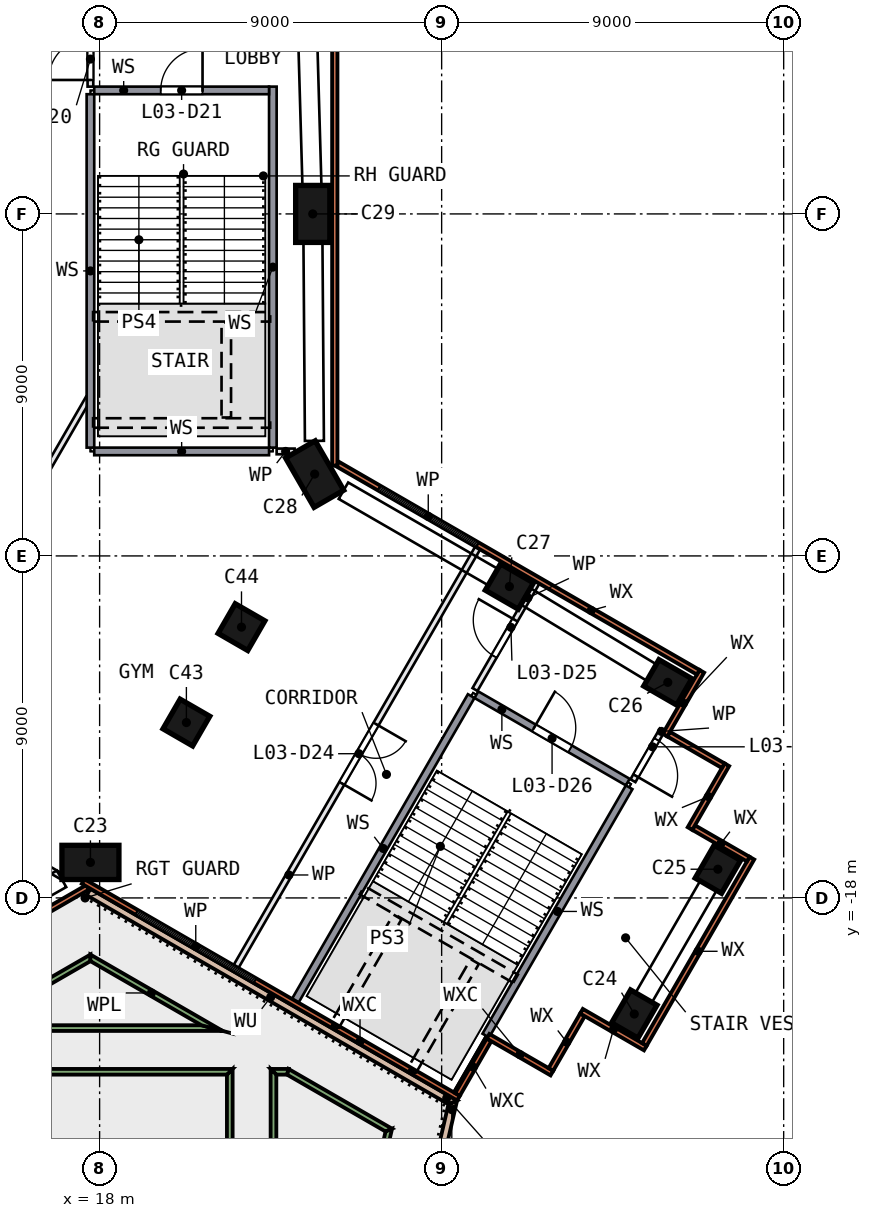
"""IFC4 building model, lengths in metres.
Left out: names, types, materials, properties, quantities, classifications, styles, units other than length and angle.
Written with IfcOpenShell. Run it as: python <this file> out.ifc"""

import sys

from ifc_helpers import new_model, si_unit, direction, frame, frame_2d, origin, origin_2d, place, context, subcontext, project, spatial, polyline, rectangle, outline, extrude, element, fill, save


model = new_model("IFC4")
c1 = context("Model", 3, precision=1e-05, world=origin(), true_north=direction((0.0, 1.0)))
c2 = subcontext(c1, "Body", "Model", "MODEL_VIEW")
j1 = project(units=[si_unit("LENGTHUNIT", "METRE"), si_unit("PLANEANGLEUNIT", "RADIAN")], contexts=[c1])
p1 = place(None, origin())
s1 = spatial("IfcSite", under=j1, at=p1, CompositionType="ELEMENT")
p2 = place(p1, origin())
s2 = spatial("IfcBuilding", under=s1, at=p2, CompositionType="ELEMENT")
p3 = place(p2, frame((0.0, 0.0, 19.0)))
s3 = spatial("IfcBuildingStorey", under=s2, at=p3, CompositionType="ELEMENT", Elevation=19.0)
p4 = place(p3, frame((17.758, -17.065, 0.0), z_axis=(0.0, 0.0, 1.0), x_axis=(-1.0, 0.0, 0.0)))
e1 = element("IfcColumn", 1, at=p4, inside=s3, PredefinedType="COLUMN", context=c2, shape_type="SweptSolid", body=[
    extrude(rectangle(XDim=1.5, YDim=0.9, at=origin_2d()), origin(), (0.0, 0.0, 1.0), 4.05),
])
for number, where, z_axis, x_axis in (
    (2, (32.069, -21.055, 0.0), (0.0, 0.0, 1.0), (0.5, 0.866, 0.0)),
    (3, (34.269, -17.245, 0.0), (0.0, 0.0, 1.0), (0.5, 0.866, 0.0)),
    (4, (32.951, -12.327, 0.0), (0.0, 0.0, 1.0), (-0.866, 0.5, 0.0)),
    (5, (28.783, -9.805, 0.0), (0.0, 0.0, 1.0), (-0.866, 0.5, 0.0)),
):
    element("IfcColumn", number, at=place(p3, frame(where, z_axis=z_axis, x_axis=x_axis)), inside=s3, PredefinedType="COLUMN", context=c2, shape_type="SweptSolid", body=[
        extrude(rectangle(XDim=1.0, YDim=0.8, at=origin_2d()), origin(), (0.0, 0.0, 1.0), 4.05),
    ])
for number, where, z_axis, x_axis in (
    (6, (23.658, -6.846, 0.0), (0.0, 0.0, 1.0), (0.5, -0.866, 0.0)),
    (7, (23.608, 0.0, 0.0), (0.0, 0.0, 1.0), (0.0, 1.0, 0.0)),
):
    element("IfcColumn", number, at=place(p3, frame(where, z_axis=z_axis, x_axis=x_axis)), inside=s3, PredefinedType="COLUMN", context=c2, shape_type="SweptSolid", body=[
        extrude(rectangle(XDim=1.5, YDim=0.9, at=origin_2d()), origin(), (0.0, 0.0, 1.0), 4.05),
    ])
for number, where, z_axis, x_axis in (
    (8, (20.283, -13.385, 0.0), (0.0, 0.0, 1.0), (0.866, -0.5, 0.0)),
    (9, (21.733, -10.873, 0.0), (0.0, 0.0, 1.0), (0.866, -0.5, 0.0)),
):
    element("IfcColumn", number, at=place(p3, frame(where, z_axis=z_axis, x_axis=x_axis)), inside=s3, PredefinedType="COLUMN", context=c2, shape_type="SweptSolid", body=[
        extrude(rectangle(XDim=0.9, YDim=0.9, at=origin_2d()), origin(), (0.0, 0.0, 1.0), 4.05),
    ])
p5 = place(p3, frame((6.603, -24.118, 0.0), z_axis=(0.0, 0.0, 1.0), x_axis=(0.866023287, 0.500003667, 0.0)))
e10 = element("IfcWall", 10, at=p5, inside=s3, PredefinedType="SOLIDWALL", context=c2, shape_type="SweptSolid", body=[
    extrude(rectangle(XDim=12.801, YDim=0.14, at=frame_2d((6.4, 0.0))), origin(), (0.0, 0.0, 1.0), 4.05),
])
p6 = place(p5, frame((1.748, 0.0, 0.9)))
e11 = element("IfcOpeningElement", 11, at=p6, cuts=e10, PredefinedType="OPENING", context=c2, shape_type="SweptSolid", body=[
    extrude(rectangle(XDim=3.0, YDim=2.4, at=frame_2d((1.5, 1.2))), frame((0.0, 0.08, 0.0), z_axis=(0.0, -1.0, 0.0), x_axis=(1.0, 0.0, 0.0)), (0.0, 0.0, 1.0), 0.16),
])
p7 = place(p5, frame((8.802, 0.0, 0.0)))
e12 = element("IfcOpeningElement", 12, at=p7, cuts=e10, PredefinedType="OPENING", context=c2, shape_type="SweptSolid", body=[
    extrude(rectangle(XDim=1.8, YDim=2.4, at=frame_2d((0.9, 1.2))), frame((0.0, 0.08, 0.0), z_axis=(0.0, -1.0, 0.0), x_axis=(1.0, 0.0, 0.0)), (0.0, 0.0, 1.0), 0.16),
])
p8 = place(p3, frame((17.565, -17.566, 0.0), z_axis=(0.0, 0.0, 1.0), x_axis=(0.866028022, -0.499995465, 0.0)))
e13 = element("IfcWall", 13, at=p8, inside=s3, PredefinedType="SOLIDWALL", context=c2, shape_type="SweptSolid", body=[
    extrude(rectangle(XDim=11.405, YDim=0.14, at=frame_2d((5.702, 0.0))), origin(), (0.0, 0.0, 1.0), 4.05),
])
p9 = place(p8, frame((1.623, 0.0, 0.9)))
e14 = element("IfcOpeningElement", 14, at=p9, cuts=e13, PredefinedType="OPENING", context=c2, shape_type="SweptSolid", body=[
    extrude(rectangle(XDim=3.6, YDim=2.4, at=frame_2d((1.8, 1.2))), frame((0.0, 0.08, 0.0), z_axis=(0.0, -1.0, 0.0), x_axis=(1.0, 0.0, 0.0)), (0.0, 0.0, 1.0), 0.16),
])
p10 = place(p3, frame((27.417, -23.173, 0.0), z_axis=(0.0, 0.0, 1.0), x_axis=(0.499951638, 0.866053324, 0.0)))
e15 = element("IfcWall", 15, at=p10, inside=s3, PredefinedType="SOLIDWALL", context=c2, shape_type="SweptSolid", body=[
    extrude(rectangle(XDim=1.66, YDim=0.14, at=frame_2d((0.83, 0.0))), origin(), (0.0, 0.0, 1.0), 4.05),
])
p11 = place(p3, frame((28.221, -21.64, 0.0), z_axis=(0.0, 0.0, 1.0), x_axis=(0.866011627, -0.500023862, 0.0)))
e16 = element("IfcWall", 16, at=p11, inside=s3, PredefinedType="SOLIDWALL", context=c2, shape_type="SweptSolid", body=[
    extrude(rectangle(XDim=1.94, YDim=0.14, at=frame_2d((0.97, 0.0))), origin(), (0.0, 0.0, 1.0), 4.05),
])
p12 = place(p3, frame((29.875, -22.514, 0.0), z_axis=(0.0, 0.0, 1.0), x_axis=(0.499998264, 0.866026406, 0.0)))
e17 = element("IfcWall", 17, at=p12, inside=s3, PredefinedType="SOLIDWALL", context=c2, shape_type="SweptSolid", body=[
    extrude(rectangle(XDim=1.66, YDim=0.14, at=frame_2d((0.83, 0.0))), origin(), (0.0, 0.0, 1.0), 4.05),
])
p13 = place(p3, frame((30.68, -20.981, 0.0), z_axis=(0.0, 0.0, 1.0), x_axis=(0.866043088, -0.499969368, 0.0)))
e18 = element("IfcWall", 18, at=p13, inside=s3, PredefinedType="SOLIDWALL", context=c2, shape_type="SweptSolid", body=[
    extrude(rectangle(XDim=1.94, YDim=0.14, at=frame_2d((0.97, 0.0))), origin(), (0.0, 0.0, 1.0), 4.05),
])
p14 = place(p3, frame((32.334, -21.855, 0.0), z_axis=(0.0, 0.0, 1.0), x_axis=(0.499985074, 0.866034021, 0.0)))
e19 = element("IfcWall", 19, at=p14, inside=s3, PredefinedType="SOLIDWALL", context=c2, shape_type="SweptSolid", body=[
    extrude(rectangle(XDim=5.66, YDim=0.14, at=frame_2d((2.83, 0.0))), origin(), (0.0, 0.0, 1.0), 4.05),
])
p15 = place(p3, frame((35.069, -16.979, 0.0), z_axis=(0.0, 0.0, 1.0), x_axis=(-0.866053324, 0.499951638, 0.0)))
e20 = element("IfcWall", 20, at=p15, inside=s3, PredefinedType="SOLIDWALL", context=c2, shape_type="SweptSolid", body=[
    extrude(rectangle(XDim=1.66, YDim=0.14, at=frame_2d((0.83, 0.0))), origin(), (0.0, 0.0, 1.0), 4.05),
])
p16 = place(p3, frame((33.535, -16.175, 0.0), z_axis=(0.0, 0.0, 1.0), x_axis=(0.500063744, 0.865988598, 0.0)))
e21 = element("IfcWall", 21, at=p16, inside=s3, PredefinedType="SOLIDWALL", context=c2, shape_type="SweptSolid", body=[
    extrude(rectangle(XDim=1.94, YDim=0.14, at=frame_2d((0.97, 0.0))), origin(), (0.0, 0.0, 1.0), 4.05),
])
p17 = place(p3, frame((34.41, -14.52, 0.0), z_axis=(0.0, 0.0, 1.0), x_axis=(-0.865989634, 0.500061949, 0.0)))
e22 = element("IfcWall", 22, at=p17, inside=s3, PredefinedType="SOLIDWALL", context=c2, shape_type="SweptSolid", body=[
    extrude(rectangle(XDim=1.66, YDim=0.14, at=frame_2d((0.83, 0.0))), origin(), (0.0, 0.0, 1.0), 4.05),
])
p18 = place(p3, frame((32.877, -13.716, 0.0), z_axis=(0.0, 0.0, 1.0), x_axis=(0.500023862, 0.866011627, 0.0)))
e23 = element("IfcWall", 23, at=p18, inside=s3, PredefinedType="SOLIDWALL", context=c2, shape_type="SweptSolid", body=[
    extrude(rectangle(XDim=1.94, YDim=0.14, at=frame_2d((0.97, 0.0))), origin(), (0.0, 0.0, 1.0), 4.05),
])
p19 = place(p3, frame((33.751, -12.062, 0.0), z_axis=(0.0, 0.0, 1.0), x_axis=(-0.86602647, 0.499998154, 0.0)))
e24 = element("IfcWall", 24, at=p19, inside=s3, PredefinedType="SOLIDWALL", context=c2, shape_type="SweptSolid", body=[
    extrude(rectangle(XDim=10.961, YDim=0.14, at=frame_2d((5.481, 0.0))), origin(), (0.0, 0.0, 1.0), 4.05),
])
p20 = place(p19, frame((6.702, 0.0, 0.9)))
e25 = element("IfcOpeningElement", 25, at=p20, cuts=e24, PredefinedType="OPENING", context=c2, shape_type="SweptSolid", body=[
    extrude(rectangle(XDim=3.0, YDim=2.4, at=frame_2d((1.5, 1.2))), frame((0.0, 0.08, 0.0), z_axis=(0.0, -1.0, 0.0), x_axis=(1.0, 0.0, 0.0)), (0.0, 0.0, 1.0), 0.16),
])
p21 = place(p3, frame((24.188, -6.621, 0.0), z_axis=(0.0, 0.0, 1.0), x_axis=(0.0, 1.0, 0.0)))
e26 = element("IfcWall", 26, at=p21, inside=s3, PredefinedType="SOLIDWALL", context=c2, shape_type="SweptSolid", body=[
    extrude(rectangle(XDim=13.242, YDim=0.14, at=frame_2d((6.621, 0.0))), origin(), (0.0, 0.0, 1.0), 4.05),
])
p22 = place(p3, origin())
e27 = element("IfcWall", 27, at=p22, inside=s3, PredefinedType="SOLIDWALL", context=c2, shape_type="SweptSolid", body=[
    extrude(outline(polyline([(25.128, -32.3), (25.287, -32.5), (27.407, -23.329), (27.179, -23.428), (25.128, -32.3)])), origin(), (0.0, 0.0, 1.0), 0.45),
])
p23 = place(p3, origin())
e28 = element("IfcWall", 28, at=p23, inside=s3, PredefinedType="SOLIDWALL", context=c2, shape_type="SweptSolid", body=[
    extrude(outline(polyline([(27.179, -23.428), (27.407, -23.329), (17.758, -17.758), (17.658, -17.931), (27.179, -23.428)])), origin(), (0.0, 0.0, 1.0), 0.45),
])
p24 = place(p3, origin())
e29 = element("IfcWall", 29, at=p24, inside=s3, PredefinedType="SOLIDWALL", context=c2, shape_type="SweptSolid", body=[
    extrude(outline(polyline([(21.5, -31.0), (21.5, -22.5), (21.35, -22.65), (21.35, -30.85), (21.5, -31.0)])), origin(), (0.0, 0.0, 1.0), 0.6),
])
p25 = place(p3, origin())
e30 = element("IfcWall", 30, at=p25, inside=s3, PredefinedType="SOLIDWALL", context=c2, shape_type="SweptSolid", body=[
    extrude(outline(polyline([(21.5, -22.5), (12.545, -22.5), (12.586, -22.65), (21.35, -22.65), (21.5, -22.5)])), origin(), (0.0, 0.0, 1.0), 0.6),
])
p26 = place(p3, origin())
e31 = element("IfcWall", 31, at=p26, inside=s3, PredefinedType="SOLIDWALL", context=c2, shape_type="SweptSolid", body=[
    extrude(outline(polyline([(17.758, -19.49), (14.278, -21.5), (14.837, -21.35), (17.758, -19.664), (17.758, -19.49)])), origin(), (0.0, 0.0, 1.0), 0.6),
])
p27 = place(p3, origin())
e32 = element("IfcWall", 32, at=p27, inside=s3, PredefinedType="SOLIDWALL", context=c2, shape_type="SweptSolid", body=[
    extrude(outline(polyline([(14.278, -21.5), (21.239, -21.5), (20.679, -21.35), (14.837, -21.35), (14.278, -21.5)])), origin(), (0.0, 0.0, 1.0), 0.6),
])
p28 = place(p3, origin())
e33 = element("IfcWall", 33, at=p28, inside=s3, PredefinedType="SOLIDWALL", context=c2, shape_type="SweptSolid", body=[
    extrude(outline(polyline([(21.239, -21.5), (17.758, -19.49), (17.758, -19.664), (20.679, -21.35), (21.239, -21.5)])), origin(), (0.0, 0.0, 1.0), 0.6),
])
p29 = place(p3, origin())
e34 = element("IfcWall", 34, at=p29, inside=s3, PredefinedType="SOLIDWALL", context=c2, shape_type="SweptSolid", body=[
    extrude(outline(polyline([(25.696, -24.073), (22.971, -22.5), (22.931, -22.65), (25.525, -24.147), (25.696, -24.073)])), origin(), (0.0, 0.0, 1.0), 0.6),
])
p30 = place(p3, origin())
e35 = element("IfcWall", 35, at=p30, inside=s3, PredefinedType="SOLIDWALL", context=c2, shape_type="SweptSolid", body=[
    extrude(outline(polyline([(22.971, -22.5), (22.5, -22.5), (22.65, -22.65), (22.931, -22.65), (22.971, -22.5)])), origin(), (0.0, 0.0, 1.0), 0.6),
])
p31 = place(p3, origin())
e36 = element("IfcWall", 36, at=p31, inside=s3, PredefinedType="SOLIDWALL", context=c2, shape_type="SweptSolid", body=[
    extrude(outline(polyline([(22.5, -22.5), (22.5, -31.0), (22.65, -30.85), (22.65, -22.65), (22.5, -22.5)])), origin(), (0.0, 0.0, 1.0), 0.6),
])
p32 = place(p3, origin())
e37 = element("IfcWall", 37, at=p32, inside=s3, PredefinedType="SOLIDWALL", context=c2, shape_type="SweptSolid", body=[
    extrude(outline(polyline([(24.094, -31.0), (25.696, -24.073), (25.525, -24.147), (23.975, -30.85), (24.094, -31.0)])), origin(), (0.0, 0.0, 1.0), 0.6),
])
p33 = place(p3, frame((12.144, -14.633, 0.0), z_axis=(0.0, 0.0, 1.0), x_axis=(0.866016603, -0.500015243, 0.0)))
e38 = element("IfcWall", 38, at=p33, inside=s3, PredefinedType="PARTITIONING", context=c2, shape_type="SweptSolid", body=[
    extrude(rectangle(XDim=5.582, YDim=0.15, at=frame_2d((2.791, 0.0))), origin(), (0.0, 0.0, 1.0), 4.05),
])
p34 = place(p3, frame((17.858, -6.25, 0.0), z_axis=(0.0, 0.0, 1.0), x_axis=(1.0, 0.0, 0.0)))
e39 = element("IfcWall", 39, at=p34, inside=s3, PredefinedType="SOLIDWALL", context=c2, shape_type="SweptSolid", body=[
    extrude(rectangle(XDim=4.6, YDim=0.2, at=frame_2d((2.3, 0.0))), origin(), (0.0, 0.0, 1.0), 4.05),
])
p35 = place(p3, frame((12.117, -14.53, 0.0), z_axis=(0.0, 0.0, 1.0), x_axis=(0.500001509, 0.866024532, 0.0)))
e40 = element("IfcWall", 40, at=p35, inside=s3, PredefinedType="PARTITIONING", context=c2, shape_type="SweptSolid", body=[
    extrude(rectangle(XDim=11.183, YDim=0.15, at=frame_2d((5.592, 0.0))), origin(), (0.0, 0.0, 1.0), 4.05),
])
p36 = place(p35, frame((5.433, 0.0, 0.0)))
e41 = element("IfcOpeningElement", 41, at=p36, cuts=e40, PredefinedType="OPENING", context=c2, shape_type="SweptSolid", body=[
    extrude(rectangle(XDim=1.8, YDim=2.1, at=frame_2d((0.9, 1.05))), frame((0.0, 0.085, 0.0), z_axis=(0.0, -1.0, 0.0), x_axis=(1.0, 0.0, 0.0)), (0.0, 0.0, 1.0), 0.17),
])
p37 = place(p3, frame((17.758, 3.15, 0.0), z_axis=(0.0, 0.0, 1.0), x_axis=(0.0, -1.0, 0.0)))
e42 = element("IfcWall", 42, at=p37, inside=s3, PredefinedType="SOLIDWALL", context=c2, shape_type="SweptSolid", body=[
    extrude(rectangle(XDim=9.3, YDim=0.2, at=frame_2d((4.65, 0.0))), origin(), (0.0, 0.0, 1.0), 4.05),
])
p38 = place(p3, frame((17.758, 3.35, 0.0), z_axis=(0.0, 0.0, 1.0), x_axis=(0.0, 1.0, 0.0)))
e43 = element("IfcWall", 43, at=p38, inside=s3, PredefinedType="PARTITIONING", context=c2, shape_type="SweptSolid", body=[
    extrude(rectangle(XDim=3.225, YDim=0.15, at=frame_2d((1.613, 0.0))), origin(), (0.0, 0.0, 1.0), 4.05),
])
p39 = place(p38, frame((0.175, 0.0, 0.0)))
e44 = element("IfcOpeningElement", 44, at=p39, cuts=e43, PredefinedType="OPENING", context=c2, shape_type="SweptSolid", body=[
    extrude(rectangle(XDim=1.1, YDim=2.1, at=frame_2d((0.55, 1.05))), frame((0.0, 0.085, 0.0), z_axis=(0.0, -1.0, 0.0), x_axis=(1.0, 0.0, 0.0)), (0.0, 0.0, 1.0), 0.17),
])
p40 = place(p3, frame((22.558, -6.15, 0.0), z_axis=(0.0, 0.0, 1.0), x_axis=(0.0, 1.0, 0.0)))
e45 = element("IfcWall", 45, at=p40, inside=s3, PredefinedType="SOLIDWALL", context=c2, shape_type="SweptSolid", body=[
    extrude(rectangle(XDim=9.5, YDim=0.2, at=frame_2d((4.75, 0.0))), origin(), (0.0, 0.0, 1.0), 4.05),
])
p41 = place(p3, frame((22.658, -6.25, 0.0), z_axis=(0.0, 0.0, 1.0), x_axis=(1.0, 0.0, 0.0)))
e46 = element("IfcWall", 46, at=p41, inside=s3, PredefinedType="PARTITIONING", context=c2, shape_type="SweptSolid", body=[
    extrude(rectangle(XDim=0.473, YDim=0.15, at=frame_2d((0.237, 0.0))), origin(), (0.0, 0.0, 1.0), 4.05),
])
p42 = place(p3, frame((17.858, 3.25, 0.0), z_axis=(0.0, 0.0, 1.0), x_axis=(1.0, 0.0, 0.0)))
e47 = element("IfcWall", 47, at=p42, inside=s3, PredefinedType="SOLIDWALL", context=c2, shape_type="SweptSolid", body=[
    extrude(rectangle(XDim=4.6, YDim=0.2, at=frame_2d((2.3, 0.0))), origin(), (0.0, 0.0, 1.0), 4.05),
])
p43 = place(p42, frame((1.75, 0.0, 0.0)))
e48 = element("IfcOpeningElement", 48, at=p43, cuts=e47, PredefinedType="OPENING", context=c2, shape_type="SweptSolid", body=[
    extrude(rectangle(XDim=1.1, YDim=2.1, at=frame_2d((0.55, 1.05))), frame((0.0, 0.11, 0.0), z_axis=(0.0, -1.0, 0.0), x_axis=(1.0, 0.0, 0.0)), (0.0, 0.0, 1.0), 0.22),
])
p44 = place(p3, frame((28.162, -21.623, 0.0), z_axis=(0.0, 0.0, 1.0), x_axis=(0.499981072, 0.866036332, 0.0)))
e49 = element("IfcWall", 49, at=p44, inside=s3, PredefinedType="SOLIDWALL", context=c2, shape_type="SweptSolid", body=[
    extrude(rectangle(XDim=7.545, YDim=0.2, at=frame_2d((3.772, 0.0))), origin(), (0.0, 0.0, 1.0), 4.05),
])
p45 = place(p3, frame((27.777, -12.688, 0.0), z_axis=(0.0, 0.0, 1.0), x_axis=(-0.500003922, -0.866023139, 0.0)))
e50 = element("IfcWall", 50, at=p45, inside=s3, PredefinedType="SOLIDWALL", context=c2, shape_type="SweptSolid", body=[
    extrude(rectangle(XDim=9.26, YDim=0.2, at=frame_2d((4.63, 0.0))), origin(), (0.0, 0.0, 1.0), 4.05),
])
p46 = place(p3, frame((27.948, -8.792, 0.0), z_axis=(0.0, 0.0, 1.0), x_axis=(-0.499991053, -0.866030569, 0.0)))
e51 = element("IfcWall", 51, at=p46, inside=s3, PredefinedType="PARTITIONING", context=c2, shape_type="SweptSolid", body=[
    extrude(rectangle(XDim=12.72, YDim=0.15, at=frame_2d((6.36, 0.0))), origin(), (0.0, 0.0, 1.0), 4.05),
])
p47 = place(p46, frame((5.35, 0.0, 0.0)))
e52 = element("IfcOpeningElement", 52, at=p47, cuts=e51, PredefinedType="OPENING", context=c2, shape_type="SweptSolid", body=[
    extrude(rectangle(XDim=1.8, YDim=2.1, at=frame_2d((0.9, 1.05))), frame((0.0, 0.085, 0.0), z_axis=(0.0, -1.0, 0.0), x_axis=(1.0, 0.0, 0.0)), (0.0, 0.0, 1.0), 0.17),
])
p48 = place(p3, frame((27.877, -12.515, 0.0), z_axis=(0.0, 0.0, 1.0), x_axis=(0.499973122, 0.866040921, 0.0)))
e53 = element("IfcWall", 53, at=p48, inside=s3, PredefinedType="PARTITIONING", context=c2, shape_type="SweptSolid", body=[
    extrude(rectangle(XDim=3.26, YDim=0.15, at=frame_2d((1.63, 0.0))), origin(), (0.0, 0.0, 1.0), 4.05),
])
p49 = place(p48, frame((1.01, 0.0, 0.0)))
e54 = element("IfcOpeningElement", 54, at=p49, cuts=e53, PredefinedType="OPENING", context=c2, shape_type="SweptSolid", body=[
    extrude(rectangle(XDim=1.1, YDim=2.1, at=frame_2d((0.55, 1.05))), frame((0.0, 0.085, 0.0), z_axis=(0.0, -1.0, 0.0), x_axis=(1.0, 0.0, 0.0)), (0.0, 0.0, 1.0), 0.17),
])
p50 = place(p3, frame((27.914, -12.652, 0.0), z_axis=(0.0, 0.0, 1.0), x_axis=(0.86601677, -0.500014953, 0.0)))
e55 = element("IfcWall", 55, at=p50, inside=s3, PredefinedType="SOLIDWALL", context=c2, shape_type="SweptSolid", body=[
    extrude(rectangle(XDim=4.6, YDim=0.2, at=frame_2d((2.3, 0.0))), origin(), (0.0, 0.0, 1.0), 4.05),
])
p51 = place(p50, frame((1.75, 0.0, 0.0)))
e56 = element("IfcOpeningElement", 56, at=p51, cuts=e55, PredefinedType="OPENING", context=c2, shape_type="SweptSolid", body=[
    extrude(rectangle(XDim=1.1, YDim=2.1, at=frame_2d((0.55, 1.05))), frame((0.0, 0.11, 0.0), z_axis=(0.0, -1.0, 0.0), x_axis=(1.0, 0.0, 0.0)), (0.0, 0.0, 1.0), 0.22),
])
p52 = place(p3, frame((32.807, -13.577, 0.0), z_axis=(0.0, 0.0, 1.0), x_axis=(-0.499995951, -0.866027742, 0.0)))
e57 = element("IfcWall", 57, at=p52, inside=s3, PredefinedType="PARTITIONING", context=c2, shape_type="SweptSolid", body=[
    extrude(rectangle(XDim=1.545, YDim=0.15, at=frame_2d((0.773, 0.0))), origin(), (0.0, 0.0, 1.0), 4.05),
])
p53 = place(p52, frame((0.295, 0.0, 0.0)))
e58 = element("IfcOpeningElement", 58, at=p53, cuts=e57, PredefinedType="OPENING", context=c2, shape_type="SweptSolid", body=[
    extrude(rectangle(XDim=1.1, YDim=2.1, at=frame_2d((0.55, 1.05))), frame((0.0, 0.085, 0.0), z_axis=(0.0, -1.0, 0.0), x_axis=(1.0, 0.0, 0.0)), (0.0, 0.0, 1.0), 0.17),
])
p54 = place(p9, origin())
e59 = element("IfcWindow", 59, at=p54, inside=s3, PartitioningType="SINGLE_PANEL", PredefinedType="WINDOW", context=c2, shape_type="SweptSolid", body=[
    extrude(rectangle(XDim=3.6, YDim=2.4, at=frame_2d((1.8, 1.2))), frame((0.0, 0.03, 0.0), z_axis=(0.0, -1.0, 0.0), x_axis=(1.0, 0.0, 0.0)), (0.0, 0.0, 1.0), 0.06),
])
fill(e14, e59)
p55 = place(p20, origin())
e60 = element("IfcWindow", 60, at=p55, inside=s3, PartitioningType="SINGLE_PANEL", PredefinedType="WINDOW", context=c2, shape_type="SweptSolid", body=[
    extrude(rectangle(XDim=3.0, YDim=2.4, at=frame_2d((1.5, 1.2))), frame((0.0, 0.03, 0.0), z_axis=(0.0, -1.0, 0.0), x_axis=(1.0, 0.0, 0.0)), (0.0, 0.0, 1.0), 0.06),
])
fill(e25, e60)
p56 = place(p39, origin())
e61 = element("IfcDoor", 61, at=p56, inside=s3, OperationType="SINGLE_SWING_LEFT", PredefinedType="DOOR", context=c2, shape_type="SweptSolid", body=[
    extrude(rectangle(XDim=1.1, YDim=2.1, at=frame_2d((0.55, 1.05))), frame((0.0, 0.025, 0.0), z_axis=(0.0, -1.0, 0.0), x_axis=(1.0, 0.0, 0.0)), (0.0, 0.0, 1.0), 0.05),
])
fill(e44, e61)
p57 = place(p43, origin())
e62 = element("IfcDoor", 62, at=p57, inside=s3, OperationType="SINGLE_SWING_RIGHT", PredefinedType="DOOR", context=c2, shape_type="SweptSolid", body=[
    extrude(rectangle(XDim=1.1, YDim=2.1, at=frame_2d((0.55, 1.05))), frame((0.0, 0.025, 0.0), z_axis=(0.0, -1.0, 0.0), x_axis=(1.0, 0.0, 0.0)), (0.0, 0.0, 1.0), 0.05),
])
fill(e48, e62)
p58 = place(p47, origin())
e63 = element("IfcDoor", 63, at=p58, inside=s3, OperationType="DOUBLE_DOOR_SINGLE_SWING", PredefinedType="DOOR", context=c2, shape_type="SweptSolid", body=[
    extrude(rectangle(XDim=1.8, YDim=2.1, at=frame_2d((0.9, 1.05))), frame((0.0, 0.025, 0.0), z_axis=(0.0, -1.0, 0.0), x_axis=(1.0, 0.0, 0.0)), (0.0, 0.0, 1.0), 0.05),
])
fill(e52, e63)
p59 = place(p49, origin())
e64 = element("IfcDoor", 64, at=p59, inside=s3, OperationType="SINGLE_SWING_RIGHT", PredefinedType="DOOR", context=c2, shape_type="SweptSolid", body=[
    extrude(rectangle(XDim=1.1, YDim=2.1, at=frame_2d((0.55, 1.05))), frame((0.0, 0.025, 0.0), z_axis=(0.0, -1.0, 0.0), x_axis=(1.0, 0.0, 0.0)), (0.0, 0.0, 1.0), 0.05),
])
fill(e54, e64)
p60 = place(p51, origin())
e65 = element("IfcDoor", 65, at=p60, inside=s3, OperationType="SINGLE_SWING_LEFT", PredefinedType="DOOR", context=c2, shape_type="SweptSolid", body=[
    extrude(rectangle(XDim=1.1, YDim=2.1, at=frame_2d((0.55, 1.05))), frame((0.0, 0.025, 0.0), z_axis=(0.0, -1.0, 0.0), x_axis=(1.0, 0.0, 0.0)), (0.0, 0.0, 1.0), 0.05),
])
fill(e56, e65)
p61 = place(p53, origin())
e66 = element("IfcDoor", 66, at=p61, inside=s3, OperationType="SINGLE_SWING_RIGHT", PredefinedType="DOOR", context=c2, shape_type="SweptSolid", body=[
    extrude(rectangle(XDim=1.1, YDim=2.1, at=frame_2d((0.55, 1.05))), frame((0.0, 0.025, 0.0), z_axis=(0.0, -1.0, 0.0), x_axis=(1.0, 0.0, 0.0)), (0.0, 0.0, 1.0), 0.05),
])
fill(e58, e66)
save(model, sys.argv[1])
